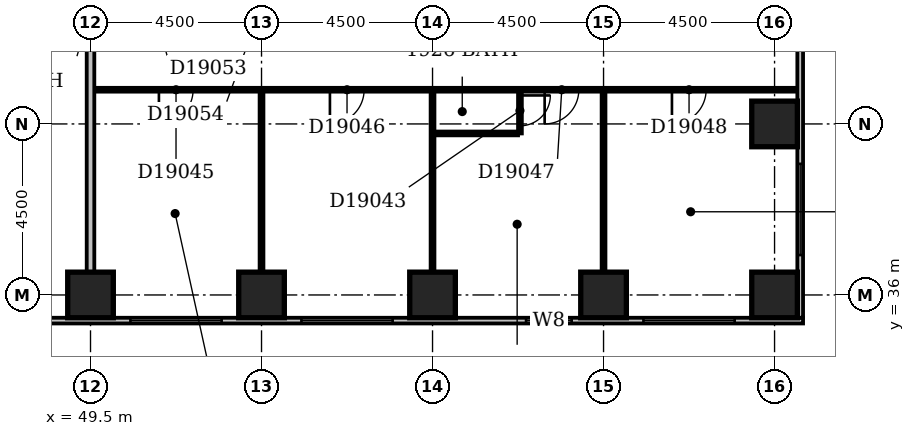
"""IFC4 building model, lengths in metres.
Left out: names, types, materials, properties, quantities, classifications, styles, units other than length and angle.
Written with IfcOpenShell. Run it as: python <this file> out.ifc"""

import sys

from ifc_helpers import new_model, si_unit, direction, frame, frame_2d, origin, origin_2d, place, context, subcontext, project, spatial, rectangle, extrude, element, fill, save


model = new_model("IFC4")
c1 = context("Model", 3, precision=1e-05, world=origin(), true_north=direction((0.0, 1.0)))
c2 = subcontext(c1, "Body", "Model", "MODEL_VIEW")
j1 = project(units=[si_unit("LENGTHUNIT", "METRE"), si_unit("PLANEANGLEUNIT", "RADIAN")], contexts=[c1])
p1 = place(None, origin())
s1 = spatial("IfcSite", under=j1, at=p1, CompositionType="ELEMENT")
p2 = place(p1, origin())
s2 = spatial("IfcBuilding", under=s1, at=p2, CompositionType="ELEMENT")
p3 = place(p2, frame((0.0, 0.0, 79.4)))
s3 = spatial("IfcBuildingStorey", under=s2, at=p3, CompositionType="ELEMENT", Elevation=79.4)
for number, where, z_axis, x_axis in (
    (1, (49.5, 36.0, -0.3), (0.0, 0.0, 1.0), (1.0, 0.0, 0.0)),
    (2, (54.0, 36.0, -0.3), (0.0, 0.0, 1.0), (1.0, 0.0, 0.0)),
    (3, (58.5, 36.0, -0.3), (0.0, 0.0, 1.0), (1.0, 0.0, 0.0)),
    (4, (63.0, 36.0, -0.3), (0.0, 0.0, 1.0), (1.0, 0.0, 0.0)),
    (5, (67.5, 36.0, -0.3), (0.0, 0.0, 1.0), (1.0, 0.0, 0.0)),
    (6, (67.5, 40.5, -0.3), (0.0, 0.0, 1.0), (1.0, 0.0, 0.0)),
):
    element("IfcColumn", number, at=place(p3, frame(where, z_axis=z_axis, x_axis=x_axis)), inside=s3, PredefinedType="COLUMN", context=c2, shape_type="SweptSolid", body=[
        extrude(rectangle(XDim=1.2, YDim=1.2, at=origin_2d()), origin(), (0.0, 0.0, 1.0), 3.6),
    ])
p4 = place(p3, frame((23.1, 35.325, 0.0), z_axis=(0.0, 0.0, 1.0), x_axis=(1.0, 0.0, 0.0)))
e7 = element("IfcWall", 7, at=p4, inside=s3, PredefinedType="STANDARD", context=c2, shape_type="SweptSolid", body=[
    extrude(rectangle(XDim=45.15, YDim=0.15, at=frame_2d((22.575, 0.0))), origin(), (0.0, 0.0, 1.0), 2.7),
])
p5 = place(p4, frame((0.45, 0.0, 0.6)))
e8 = element("IfcOpeningElement", 8, at=p5, cuts=e7, PredefinedType="OPENING", context=c2, shape_type="SweptSolid", body=[
    extrude(rectangle(XDim=2.4, YDim=1.8, at=frame_2d((1.2, 0.9))), frame((0.0, 0.087, 0.0), z_axis=(0.0, -1.0, 0.0), x_axis=(1.0, 0.0, 0.0)), (0.0, 0.0, 1.0), 0.174),
])
p6 = place(p4, frame((4.793, 0.0, 0.6)))
e9 = element("IfcOpeningElement", 9, at=p6, cuts=e7, PredefinedType="OPENING", context=c2, shape_type="SweptSolid", body=[
    extrude(rectangle(XDim=1.8, YDim=1.8, at=frame_2d((0.9, 0.9))), frame((0.0, 0.087, 0.0), z_axis=(0.0, -1.0, 0.0), x_axis=(1.0, 0.0, 0.0)), (0.0, 0.0, 1.0), 0.174),
])
p7 = place(p4, frame((9.45, 0.0, 0.6)))
e10 = element("IfcOpeningElement", 10, at=p7, cuts=e7, PredefinedType="OPENING", context=c2, shape_type="SweptSolid", body=[
    extrude(rectangle(XDim=2.4, YDim=1.8, at=frame_2d((1.2, 0.9))), frame((0.0, 0.087, 0.0), z_axis=(0.0, -1.0, 0.0), x_axis=(1.0, 0.0, 0.0)), (0.0, 0.0, 1.0), 0.174),
])
p8 = place(p4, frame((13.95, 0.0, 0.6)))
e11 = element("IfcOpeningElement", 11, at=p8, cuts=e7, PredefinedType="OPENING", context=c2, shape_type="SweptSolid", body=[
    extrude(rectangle(XDim=2.4, YDim=1.8, at=frame_2d((1.2, 0.9))), frame((0.0, 0.087, 0.0), z_axis=(0.0, -1.0, 0.0), x_axis=(1.0, 0.0, 0.0)), (0.0, 0.0, 1.0), 0.174),
])
p9 = place(p4, frame((19.597, 0.0, 0.6)))
e12 = element("IfcOpeningElement", 12, at=p9, cuts=e7, PredefinedType="OPENING", context=c2, shape_type="SweptSolid", body=[
    extrude(rectangle(XDim=1.5, YDim=1.8, at=frame_2d((0.75, 0.9))), frame((0.0, 0.087, 0.0), z_axis=(0.0, -1.0, 0.0), x_axis=(1.0, 0.0, 0.0)), (0.0, 0.0, 1.0), 0.174),
])
p10 = place(p4, frame((22.95, 0.0, 0.6)))
e13 = element("IfcOpeningElement", 13, at=p10, cuts=e7, PredefinedType="OPENING", context=c2, shape_type="SweptSolid", body=[
    extrude(rectangle(XDim=2.4, YDim=1.8, at=frame_2d((1.2, 0.9))), frame((0.0, 0.087, 0.0), z_axis=(0.0, -1.0, 0.0), x_axis=(1.0, 0.0, 0.0)), (0.0, 0.0, 1.0), 0.174),
])
p11 = place(p4, frame((27.45, 0.0, 0.6)))
e14 = element("IfcOpeningElement", 14, at=p11, cuts=e7, PredefinedType="OPENING", context=c2, shape_type="SweptSolid", body=[
    extrude(rectangle(XDim=2.4, YDim=1.8, at=frame_2d((1.2, 0.9))), frame((0.0, 0.087, 0.0), z_axis=(0.0, -1.0, 0.0), x_axis=(1.0, 0.0, 0.0)), (0.0, 0.0, 1.0), 0.174),
])
p12 = place(p4, frame((31.95, 0.0, 0.6)))
e15 = element("IfcOpeningElement", 15, at=p12, cuts=e7, PredefinedType="OPENING", context=c2, shape_type="SweptSolid", body=[
    extrude(rectangle(XDim=2.4, YDim=1.8, at=frame_2d((1.2, 0.9))), frame((0.0, 0.087, 0.0), z_axis=(0.0, -1.0, 0.0), x_axis=(1.0, 0.0, 0.0)), (0.0, 0.0, 1.0), 0.174),
])
p13 = place(p4, frame((37.861, 0.0, 0.6)))
e16 = element("IfcOpeningElement", 16, at=p13, cuts=e7, PredefinedType="OPENING", context=c2, shape_type="SweptSolid", body=[
    extrude(rectangle(XDim=1.2, YDim=1.8, at=frame_2d((0.6, 0.9))), frame((0.0, 0.087, 0.0), z_axis=(0.0, -1.0, 0.0), x_axis=(1.0, 0.0, 0.0)), (0.0, 0.0, 1.0), 0.174),
])
p14 = place(p4, frame((40.95, 0.0, 0.6)))
e17 = element("IfcOpeningElement", 17, at=p14, cuts=e7, PredefinedType="OPENING", context=c2, shape_type="SweptSolid", body=[
    extrude(rectangle(XDim=2.4, YDim=1.8, at=frame_2d((1.2, 0.9))), frame((0.0, 0.087, 0.0), z_axis=(0.0, -1.0, 0.0), x_axis=(1.0, 0.0, 0.0)), (0.0, 0.0, 1.0), 0.174),
])
p15 = place(p3, frame((68.175, 35.4, 0.0), z_axis=(0.0, 0.0, 1.0), x_axis=(0.0, 1.0, 0.0)))
e18 = element("IfcWall", 18, at=p15, inside=s3, PredefinedType="STANDARD", context=c2, shape_type="SweptSolid", body=[
    extrude(rectangle(XDim=23.85, YDim=0.15, at=frame_2d((11.925, 0.0))), origin(), (0.0, 0.0, 1.0), 2.7),
])
p16 = place(p15, frame((1.65, 0.0, 0.6)))
e19 = element("IfcOpeningElement", 19, at=p16, cuts=e18, PredefinedType="OPENING", context=c2, shape_type="SweptSolid", body=[
    extrude(rectangle(XDim=2.4, YDim=1.8, at=frame_2d((1.2, 0.9))), frame((0.0, 0.087, 0.0), z_axis=(0.0, -1.0, 0.0), x_axis=(1.0, 0.0, 0.0)), (0.0, 0.0, 1.0), 0.174),
])
p17 = place(p15, frame((10.65, 0.0, 0.6)))
e20 = element("IfcOpeningElement", 20, at=p17, cuts=e18, PredefinedType="OPENING", context=c2, shape_type="SweptSolid", body=[
    extrude(rectangle(XDim=2.4, YDim=1.8, at=frame_2d((1.2, 0.9))), frame((0.0, 0.087, 0.0), z_axis=(0.0, -1.0, 0.0), x_axis=(1.0, 0.0, 0.0)), (0.0, 0.0, 1.0), 0.174),
])
p18 = place(p15, frame((19.65, 0.0, 0.6)))
e21 = element("IfcOpeningElement", 21, at=p18, cuts=e18, PredefinedType="OPENING", context=c2, shape_type="SweptSolid", body=[
    extrude(rectangle(XDim=2.4, YDim=1.8, at=frame_2d((1.2, 0.9))), frame((0.0, 0.087, 0.0), z_axis=(0.0, -1.0, 0.0), x_axis=(1.0, 0.0, 0.0)), (0.0, 0.0, 1.0), 0.174),
])
p19 = place(p3, frame((49.5, 36.6, 0.0), z_axis=(0.0, 0.0, 1.0), x_axis=(0.0, 1.0, 0.0)))
e22 = element("IfcWall", 22, at=p19, inside=s3, PredefinedType="PARTITIONING", context=c2, shape_type="SweptSolid", body=[
    extrude(rectangle(XDim=12.8, YDim=0.2, at=frame_2d((6.4, 0.0))), origin(), (0.0, 0.0, 1.0), 3.3),
])
p20 = place(p3, frame((54.0, 36.6, 0.0), z_axis=(0.0, 0.0, 1.0), x_axis=(0.0, 1.0, 0.0)))
e23 = element("IfcWall", 23, at=p20, inside=s3, PredefinedType="PARTITIONING", context=c2, shape_type="SweptSolid", body=[
    extrude(rectangle(XDim=4.75, YDim=0.1, at=frame_2d((2.375, 0.0))), origin(), (0.0, 0.0, 1.0), 2.6),
])
p21 = place(p3, frame((58.5, 36.6, 0.0), z_axis=(0.0, 0.0, 1.0), x_axis=(0.0, 1.0, 0.0)))
e24 = element("IfcWall", 24, at=p21, inside=s3, PredefinedType="PARTITIONING", context=c2, shape_type="SweptSolid", body=[
    extrude(rectangle(XDim=4.75, YDim=0.1, at=frame_2d((2.375, 0.0))), origin(), (0.0, 0.0, 1.0), 3.3),
])
p22 = place(p3, frame((63.0, 36.6, 0.0), z_axis=(0.0, 0.0, 1.0), x_axis=(0.0, 1.0, 0.0)))
e25 = element("IfcWall", 25, at=p22, inside=s3, PredefinedType="PARTITIONING", context=c2, shape_type="SweptSolid", body=[
    extrude(rectangle(XDim=4.75, YDim=0.1, at=frame_2d((2.375, 0.0))), origin(), (0.0, 0.0, 1.0), 2.4),
])
p23 = place(p3, frame((58.55, 40.25, 0.0), z_axis=(0.0, 0.0, 1.0), x_axis=(1.0, 0.0, 0.0)))
e26 = element("IfcWall", 26, at=p23, inside=s3, PredefinedType="PLUMBINGWALL", context=c2, shape_type="SweptSolid", body=[
    extrude(rectangle(XDim=2.2, YDim=0.1, at=frame_2d((1.1, 0.0))), origin(), (0.0, 0.0, 1.0), 3.3),
])
p24 = place(p3, frame((60.8, 40.25, 0.0), z_axis=(0.0, 0.0, 1.0), x_axis=(0.0, 1.0, 0.0)))
e27 = element("IfcWall", 27, at=p24, inside=s3, PredefinedType="PLUMBINGWALL", context=c2, shape_type="SweptSolid", body=[
    extrude(rectangle(XDim=1.1, YDim=0.1, at=frame_2d((0.55, 0.0))), origin(), (0.0, 0.0, 1.0), 3.3),
])
p25 = place(p24, frame((0.2, 0.0, 0.0)))
e28 = element("IfcOpeningElement", 28, at=p25, cuts=e27, PredefinedType="OPENING", context=c2, shape_type="SweptSolid", body=[
    extrude(rectangle(XDim=0.8, YDim=2.1, at=frame_2d((0.4, 1.05))), frame((0.0, 0.062, 0.0), z_axis=(0.0, -1.0, 0.0), x_axis=(1.0, 0.0, 0.0)), (0.0, 0.0, 1.0), 0.124),
])
p26 = place(p3, frame((49.6, 41.4, 0.0), z_axis=(0.0, 0.0, 1.0), x_axis=(1.0, 0.0, 0.0)))
e29 = element("IfcWall", 29, at=p26, inside=s3, PredefinedType="PARTITIONING", context=c2, shape_type="SweptSolid", body=[
    extrude(rectangle(XDim=18.5, YDim=0.1, at=frame_2d((9.25, 0.0))), origin(), (0.0, 0.0, 1.0), 3.3),
])
p27 = place(p26, frame((1.7, 0.0, 0.0)))
e30 = element("IfcOpeningElement", 30, at=p27, cuts=e29, PredefinedType="OPENING", context=c2, shape_type="SweptSolid", body=[
    extrude(rectangle(XDim=0.9, YDim=2.1, at=frame_2d((0.45, 1.05))), frame((0.0, 0.062, 0.0), z_axis=(0.0, -1.0, 0.0), x_axis=(1.0, 0.0, 0.0)), (0.0, 0.0, 1.0), 0.124),
])
p28 = place(p26, frame((6.2, 0.0, 0.0)))
e31 = element("IfcOpeningElement", 31, at=p28, cuts=e29, PredefinedType="OPENING", context=c2, shape_type="SweptSolid", body=[
    extrude(rectangle(XDim=0.9, YDim=2.1, at=frame_2d((0.45, 1.05))), frame((0.0, 0.062, 0.0), z_axis=(0.0, -1.0, 0.0), x_axis=(1.0, 0.0, 0.0)), (0.0, 0.0, 1.0), 0.124),
])
p29 = place(p26, frame((11.85, 0.0, 0.0)))
e32 = element("IfcOpeningElement", 32, at=p29, cuts=e29, PredefinedType="OPENING", context=c2, shape_type="SweptSolid", body=[
    extrude(rectangle(XDim=0.9, YDim=2.1, at=frame_2d((0.45, 1.05))), frame((0.0, 0.062, 0.0), z_axis=(0.0, -1.0, 0.0), x_axis=(1.0, 0.0, 0.0)), (0.0, 0.0, 1.0), 0.124),
])
p30 = place(p26, frame((15.2, 0.0, 0.0)))
e33 = element("IfcOpeningElement", 33, at=p30, cuts=e29, PredefinedType="OPENING", context=c2, shape_type="SweptSolid", body=[
    extrude(rectangle(XDim=0.9, YDim=2.1, at=frame_2d((0.45, 1.05))), frame((0.0, 0.062, 0.0), z_axis=(0.0, -1.0, 0.0), x_axis=(1.0, 0.0, 0.0)), (0.0, 0.0, 1.0), 0.124),
])
p31 = place(p11, origin())
e34 = element("IfcWindow", 34, at=p31, inside=s3, PartitioningType="SINGLE_PANEL", PredefinedType="WINDOW", context=c2, shape_type="SweptSolid", body=[
    extrude(rectangle(XDim=2.4, YDim=1.8, at=frame_2d((1.2, 0.9))), frame((0.0, 0.03, 0.0), z_axis=(0.0, -1.0, 0.0), x_axis=(1.0, 0.0, 0.0)), (0.0, 0.0, 1.0), 0.06),
])
fill(e14, e34)
p32 = place(p12, origin())
e35 = element("IfcWindow", 35, at=p32, inside=s3, PartitioningType="SINGLE_PANEL", PredefinedType="WINDOW", context=c2, shape_type="SweptSolid", body=[
    extrude(rectangle(XDim=2.4, YDim=1.8, at=frame_2d((1.2, 0.9))), frame((0.0, 0.03, 0.0), z_axis=(0.0, -1.0, 0.0), x_axis=(1.0, 0.0, 0.0)), (0.0, 0.0, 1.0), 0.06),
])
fill(e15, e35)
p33 = place(p13, origin())
e36 = element("IfcWindow", 36, at=p33, inside=s3, PartitioningType="SINGLE_PANEL", PredefinedType="WINDOW", context=c2, shape_type="SweptSolid", body=[
    extrude(rectangle(XDim=1.2, YDim=1.8, at=frame_2d((0.6, 0.9))), frame((0.0, 0.03, 0.0), z_axis=(0.0, -1.0, 0.0), x_axis=(1.0, 0.0, 0.0)), (0.0, 0.0, 1.0), 0.06),
])
fill(e16, e36)
p34 = place(p14, origin())
e37 = element("IfcWindow", 37, at=p34, inside=s3, PartitioningType="SINGLE_PANEL", PredefinedType="WINDOW", context=c2, shape_type="SweptSolid", body=[
    extrude(rectangle(XDim=2.4, YDim=1.8, at=frame_2d((1.2, 0.9))), frame((0.0, 0.03, 0.0), z_axis=(0.0, -1.0, 0.0), x_axis=(1.0, 0.0, 0.0)), (0.0, 0.0, 1.0), 0.06),
])
fill(e17, e37)
p35 = place(p16, origin())
e38 = element("IfcWindow", 38, at=p35, inside=s3, PartitioningType="SINGLE_PANEL", PredefinedType="WINDOW", context=c2, shape_type="SweptSolid", body=[
    extrude(rectangle(XDim=2.4, YDim=1.8, at=frame_2d((1.2, 0.9))), frame((0.0, 0.03, 0.0), z_axis=(0.0, -1.0, 0.0), x_axis=(1.0, 0.0, 0.0)), (0.0, 0.0, 1.0), 0.06),
])
fill(e19, e38)
p36 = place(p25, origin())
e39 = element("IfcDoor", 39, at=p36, inside=s3, OperationType="SINGLE_SWING_RIGHT", PredefinedType="DOOR", context=c2, shape_type="SweptSolid", body=[
    extrude(rectangle(XDim=0.8, YDim=2.1, at=frame_2d((0.4, 1.05))), frame((0.0, 0.025, 0.0), z_axis=(0.0, -1.0, 0.0), x_axis=(1.0, 0.0, 0.0)), (0.0, 0.0, 1.0), 0.05),
])
fill(e28, e39)
p37 = place(p27, frame((0.9, 0.0, 0.0), z_axis=(0.0, 0.0, 1.0), x_axis=(-1.0, 0.0, 0.0)))
e40 = element("IfcDoor", 40, at=p37, inside=s3, OperationType="SINGLE_SWING_RIGHT", PredefinedType="DOOR", context=c2, shape_type="SweptSolid", body=[
    extrude(rectangle(XDim=0.9, YDim=2.1, at=frame_2d((0.45, 1.05))), frame((0.0, 0.025, 0.0), z_axis=(0.0, -1.0, 0.0), x_axis=(1.0, 0.0, 0.0)), (0.0, 0.0, 1.0), 0.05),
])
fill(e30, e40)
p38 = place(p28, frame((0.9, 0.0, 0.0), z_axis=(0.0, 0.0, 1.0), x_axis=(-1.0, 0.0, 0.0)))
e41 = element("IfcDoor", 41, at=p38, inside=s3, OperationType="SINGLE_SWING_RIGHT", PredefinedType="DOOR", context=c2, shape_type="SweptSolid", body=[
    extrude(rectangle(XDim=0.9, YDim=2.1, at=frame_2d((0.45, 1.05))), frame((0.0, 0.025, 0.0), z_axis=(0.0, -1.0, 0.0), x_axis=(1.0, 0.0, 0.0)), (0.0, 0.0, 1.0), 0.05),
])
fill(e31, e41)
p39 = place(p29, frame((0.9, 0.0, 0.0), z_axis=(0.0, 0.0, 1.0), x_axis=(-1.0, 0.0, 0.0)))
e42 = element("IfcDoor", 42, at=p39, inside=s3, OperationType="SINGLE_SWING_RIGHT", PredefinedType="DOOR", context=c2, shape_type="SweptSolid", body=[
    extrude(rectangle(XDim=0.9, YDim=2.1, at=frame_2d((0.45, 1.05))), frame((0.0, 0.025, 0.0), z_axis=(0.0, -1.0, 0.0), x_axis=(1.0, 0.0, 0.0)), (0.0, 0.0, 1.0), 0.05),
])
fill(e32, e42)
p40 = place(p30, frame((0.9, 0.0, 0.0), z_axis=(0.0, 0.0, 1.0), x_axis=(-1.0, 0.0, 0.0)))
e43 = element("IfcDoor", 43, at=p40, inside=s3, OperationType="SINGLE_SWING_RIGHT", PredefinedType="DOOR", context=c2, shape_type="SweptSolid", body=[
    extrude(rectangle(XDim=0.9, YDim=2.1, at=frame_2d((0.45, 1.05))), frame((0.0, 0.025, 0.0), z_axis=(0.0, -1.0, 0.0), x_axis=(1.0, 0.0, 0.0)), (0.0, 0.0, 1.0), 0.05),
])
fill(e33, e43)
save(model, sys.argv[1])
